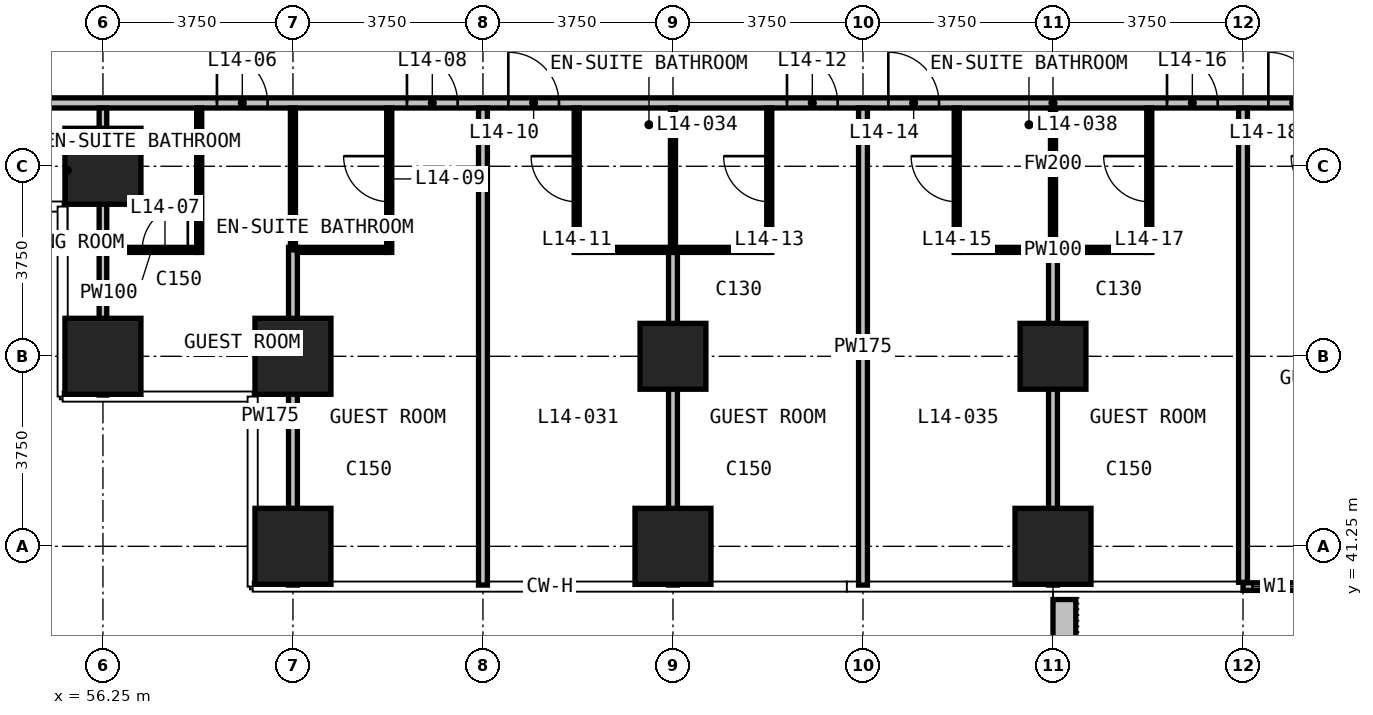
"""IFC4 building model, lengths in metres.
Left out: names, types, materials, properties, quantities, classifications, styles, units other than length and angle.
Written with IfcOpenShell. Run it as: python <this file> out.ifc"""

import sys

from ifc_helpers import new_model, si_unit, direction, frame, frame_2d, origin, origin_2d, place, context, subcontext, project, spatial, rectangle, extrude, element, fill, save


model = new_model("IFC4")
c1 = context("Model", 3, precision=1e-05, world=origin(), true_north=direction((0.0, 1.0)))
c2 = subcontext(c1, "Body", "Model", "MODEL_VIEW")
j1 = project(units=[si_unit("LENGTHUNIT", "METRE"), si_unit("PLANEANGLEUNIT", "RADIAN")], contexts=[c1])
p1 = place(None, origin())
s1 = spatial("IfcSite", under=j1, at=p1, CompositionType="ELEMENT")
p2 = place(p1, origin())
s2 = spatial("IfcBuilding", under=s1, at=p2, CompositionType="ELEMENT")
p3 = place(p2, frame((0.0, 0.0, 65.9)))
s3 = spatial("IfcBuildingStorey", under=s2, at=p3, CompositionType="ELEMENT", Elevation=65.9)
for number, where, z_axis, x_axis in (
    (1, (56.25, 45.0, 0.0), (0.0, 0.0, 1.0), (1.0, 0.0, 0.0)),
    (2, (56.25, 48.75, 0.0), (0.0, 0.0, 1.0), (1.0, 0.0, 0.0)),
    (3, (60.0, 41.25, 0.0), (0.0, 0.0, 1.0), (1.0, 0.0, 0.0)),
    (4, (60.0, 45.0, 0.0), (0.0, 0.0, 1.0), (1.0, 0.0, 0.0)),
    (5, (67.5, 41.25, 0.0), (0.0, 0.0, 1.0), (1.0, 0.0, 0.0)),
):
    element("IfcColumn", number, at=place(p3, frame(where, z_axis=z_axis, x_axis=x_axis)), inside=s3, PredefinedType="COLUMN", context=c2, shape_type="SweptSolid", body=[
        extrude(rectangle(XDim=1.5, YDim=1.5, at=origin_2d()), origin(), (0.0, 0.0, 1.0), 3.3),
    ])
p4 = place(p3, frame((67.5, 45.0, 0.0), z_axis=(0.0, 0.0, 1.0), x_axis=(1.0, 0.0, 0.0)))
e6 = element("IfcColumn", 6, at=p4, inside=s3, PredefinedType="COLUMN", context=c2, shape_type="SweptSolid", body=[
    extrude(rectangle(XDim=1.3, YDim=1.3, at=origin_2d()), origin(), (0.0, 0.0, 1.0), 3.3),
])
p5 = place(p3, frame((75.0, 41.25, 0.0), z_axis=(0.0, 0.0, 1.0), x_axis=(1.0, 0.0, 0.0)))
e7 = element("IfcColumn", 7, at=p5, inside=s3, PredefinedType="COLUMN", context=c2, shape_type="SweptSolid", body=[
    extrude(rectangle(XDim=1.5, YDim=1.5, at=origin_2d()), origin(), (0.0, 0.0, 1.0), 3.3),
])
p6 = place(p3, frame((75.0, 45.0, 0.0), z_axis=(0.0, 0.0, 1.0), x_axis=(1.0, 0.0, 0.0)))
e8 = element("IfcColumn", 8, at=p6, inside=s3, PredefinedType="COLUMN", context=c2, shape_type="SweptSolid", body=[
    extrude(rectangle(XDim=1.3, YDim=1.3, at=origin_2d()), origin(), (0.0, 0.0, 1.0), 3.3),
])
p7 = place(p3, frame((78.75, 40.455, 0.0), z_axis=(0.0, 0.0, 1.0), x_axis=(1.0, 0.0, 0.0)))
e9 = element("IfcWall", 9, at=p7, inside=s3, PredefinedType="SOLIDWALL", context=c2, shape_type="SweptSolid", body=[
    extrude(rectangle(XDim=3.75, YDim=0.15, at=frame_2d((1.875, 0.0))), origin(), (0.0, 0.0, 1.0), 3.0),
])
p8 = place(p7, frame((0.188, 0.0, 0.1)))
e10 = element("IfcOpeningElement", 10, at=p8, cuts=e9, PredefinedType="OPENING", context=c2, shape_type="SweptSolid", body=[
    extrude(rectangle(XDim=0.9, YDim=2.4, at=frame_2d((0.45, 1.2))), frame((0.0, 0.085, 0.0), z_axis=(0.0, -1.0, 0.0), x_axis=(1.0, 0.0, 0.0)), (0.0, 0.0, 1.0), 0.17),
])
p9 = place(p7, frame((1.275, 0.0, 0.0)))
e11 = element("IfcOpeningElement", 11, at=p9, cuts=e9, PredefinedType="OPENING", context=c2, shape_type="SweptSolid", body=[
    extrude(rectangle(XDim=1.2, YDim=2.4, at=frame_2d((0.6, 1.2))), frame((0.0, 0.085, 0.0), z_axis=(0.0, -1.0, 0.0), x_axis=(1.0, 0.0, 0.0)), (0.0, 0.0, 1.0), 0.17),
])
p10 = place(p3, frame((75.225, 40.2, 0.0), z_axis=(0.0, 0.0, 1.0), x_axis=(0.0, -1.0, 0.0)))
e12 = element("IfcWall", 12, at=p10, inside=s3, PredefinedType="USERDEFINED", context=c2, shape_type="SweptSolid", body=[
    extrude(rectangle(XDim=2.35, YDim=0.45, at=frame_2d((1.175, 0.0))), origin(), (0.0, 0.0, 1.0), 1.1),
])
p11 = place(p3, frame((51.735, 50.0, 0.0), z_axis=(0.0, 0.0, 1.0), x_axis=(1.0, 0.0, 0.0)))
e13 = element("IfcWall", 13, at=p11, inside=s3, PredefinedType="PARTITIONING", context=c2, shape_type="SweptSolid", body=[
    extrude(rectangle(XDim=46.53, YDim=0.2, at=frame_2d((23.265, 0.0))), origin(), (0.0, 0.0, 1.0), 3.0),
])
p12 = place(p11, frame((6.765, 0.0, 0.0)))
e14 = element("IfcOpeningElement", 14, at=p12, cuts=e13, PredefinedType="OPENING", context=c2, shape_type="SweptSolid", body=[
    extrude(rectangle(XDim=1.0, YDim=2.2, at=frame_2d((0.5, 1.1))), frame((0.0, 0.11, 0.0), z_axis=(0.0, -1.0, 0.0), x_axis=(1.0, 0.0, 0.0)), (0.0, 0.0, 1.0), 0.22),
])
p13 = place(p11, frame((10.515, 0.0, 0.0)))
e15 = element("IfcOpeningElement", 15, at=p13, cuts=e13, PredefinedType="OPENING", context=c2, shape_type="SweptSolid", body=[
    extrude(rectangle(XDim=1.0, YDim=2.2, at=frame_2d((0.5, 1.1))), frame((0.0, 0.11, 0.0), z_axis=(0.0, -1.0, 0.0), x_axis=(1.0, 0.0, 0.0)), (0.0, 0.0, 1.0), 0.22),
])
p14 = place(p11, frame((12.515, 0.0, 0.0)))
e16 = element("IfcOpeningElement", 16, at=p14, cuts=e13, PredefinedType="OPENING", context=c2, shape_type="SweptSolid", body=[
    extrude(rectangle(XDim=1.0, YDim=2.2, at=frame_2d((0.5, 1.1))), frame((0.0, 0.11, 0.0), z_axis=(0.0, -1.0, 0.0), x_axis=(1.0, 0.0, 0.0)), (0.0, 0.0, 1.0), 0.22),
])
p15 = place(p11, frame((18.015, 0.0, 0.0)))
e17 = element("IfcOpeningElement", 17, at=p15, cuts=e13, PredefinedType="OPENING", context=c2, shape_type="SweptSolid", body=[
    extrude(rectangle(XDim=1.0, YDim=2.2, at=frame_2d((0.5, 1.1))), frame((0.0, 0.11, 0.0), z_axis=(0.0, -1.0, 0.0), x_axis=(1.0, 0.0, 0.0)), (0.0, 0.0, 1.0), 0.22),
])
p16 = place(p11, frame((20.015, 0.0, 0.0)))
e18 = element("IfcOpeningElement", 18, at=p16, cuts=e13, PredefinedType="OPENING", context=c2, shape_type="SweptSolid", body=[
    extrude(rectangle(XDim=1.0, YDim=2.2, at=frame_2d((0.5, 1.1))), frame((0.0, 0.11, 0.0), z_axis=(0.0, -1.0, 0.0), x_axis=(1.0, 0.0, 0.0)), (0.0, 0.0, 1.0), 0.22),
])
p17 = place(p11, frame((25.515, 0.0, 0.0)))
e19 = element("IfcOpeningElement", 19, at=p17, cuts=e13, PredefinedType="OPENING", context=c2, shape_type="SweptSolid", body=[
    extrude(rectangle(XDim=1.0, YDim=2.2, at=frame_2d((0.5, 1.1))), frame((0.0, 0.11, 0.0), z_axis=(0.0, -1.0, 0.0), x_axis=(1.0, 0.0, 0.0)), (0.0, 0.0, 1.0), 0.22),
])
p18 = place(p11, frame((27.515, 0.0, 0.0)))
e20 = element("IfcOpeningElement", 20, at=p18, cuts=e13, PredefinedType="OPENING", context=c2, shape_type="SweptSolid", body=[
    extrude(rectangle(XDim=1.0, YDim=2.2, at=frame_2d((0.5, 1.1))), frame((0.0, 0.11, 0.0), z_axis=(0.0, -1.0, 0.0), x_axis=(1.0, 0.0, 0.0)), (0.0, 0.0, 1.0), 0.22),
])
p19 = place(p11, frame((33.015, 0.0, 0.0)))
e21 = element("IfcOpeningElement", 21, at=p19, cuts=e13, PredefinedType="OPENING", context=c2, shape_type="SweptSolid", body=[
    extrude(rectangle(XDim=1.0, YDim=2.2, at=frame_2d((0.5, 1.1))), frame((0.0, 0.11, 0.0), z_axis=(0.0, -1.0, 0.0), x_axis=(1.0, 0.0, 0.0)), (0.0, 0.0, 1.0), 0.22),
])
p20 = place(p11, frame((35.015, 0.0, 0.0)))
e22 = element("IfcOpeningElement", 22, at=p20, cuts=e13, PredefinedType="OPENING", context=c2, shape_type="SweptSolid", body=[
    extrude(rectangle(XDim=1.0, YDim=2.2, at=frame_2d((0.5, 1.1))), frame((0.0, 0.11, 0.0), z_axis=(0.0, -1.0, 0.0), x_axis=(1.0, 0.0, 0.0)), (0.0, 0.0, 1.0), 0.22),
])
p21 = place(p11, frame((38.765, 0.0, 0.0)))
e23 = element("IfcOpeningElement", 23, at=p21, cuts=e13, PredefinedType="OPENING", context=c2, shape_type="SweptSolid", body=[
    extrude(rectangle(XDim=1.0, YDim=2.2, at=frame_2d((0.5, 1.1))), frame((0.0, 0.11, 0.0), z_axis=(0.0, -1.0, 0.0), x_axis=(1.0, 0.0, 0.0)), (0.0, 0.0, 1.0), 0.22),
])
p22 = place(p11, frame((1.8, 0.0, 0.0)))
e24 = element("IfcOpeningElement", 24, at=p22, cuts=e13, PredefinedType="OPENING", context=c2, shape_type="SweptSolid", body=[
    extrude(rectangle(XDim=0.9, YDim=2.2, at=frame_2d((0.45, 1.1))), frame((0.0, 0.11, 0.0), z_axis=(0.0, -1.0, 0.0), x_axis=(1.0, 0.0, 0.0)), (0.0, 0.0, 1.0), 0.22),
])
p23 = place(p11, frame((43.815, 0.0, 0.0)))
e25 = element("IfcOpeningElement", 25, at=p23, cuts=e13, PredefinedType="OPENING", context=c2, shape_type="SweptSolid", body=[
    extrude(rectangle(XDim=0.9, YDim=2.2, at=frame_2d((0.45, 1.1))), frame((0.0, 0.11, 0.0), z_axis=(0.0, -1.0, 0.0), x_axis=(1.0, 0.0, 0.0)), (0.0, 0.0, 1.0), 0.22),
])
p24 = place(p3, frame((60.0, 40.485, 0.0), z_axis=(0.0, 0.0, 1.0), x_axis=(0.0, 1.0, 0.0)))
e26 = element("IfcWall", 26, at=p24, inside=s3, PredefinedType="PARTITIONING", context=c2, shape_type="SweptSolid", body=[
    extrude(rectangle(XDim=6.665, YDim=0.175, at=frame_2d((3.333, 0.0))), origin(), (0.0, 0.0, 1.0), 3.0),
])
p25 = place(p3, frame((63.75, 40.485, 0.0), z_axis=(0.0, 0.0, 1.0), x_axis=(0.0, 1.0, 0.0)))
e27 = element("IfcWall", 27, at=p25, inside=s3, PredefinedType="PARTITIONING", context=c2, shape_type="SweptSolid", body=[
    extrude(rectangle(XDim=9.415, YDim=0.175, at=frame_2d((4.708, 0.0))), origin(), (0.0, 0.0, 1.0), 3.0),
])
p26 = place(p3, frame((67.5, 40.485, 0.0), z_axis=(0.0, 0.0, 1.0), x_axis=(0.0, 1.0, 0.0)))
e28 = element("IfcWall", 28, at=p26, inside=s3, PredefinedType="PARTITIONING", context=c2, shape_type="SweptSolid", body=[
    extrude(rectangle(XDim=6.565, YDim=0.175, at=frame_2d((3.282, 0.0))), origin(), (0.0, 0.0, 1.0), 3.0),
])
p27 = place(p3, frame((71.25, 40.485, 0.0), z_axis=(0.0, 0.0, 1.0), x_axis=(0.0, 1.0, 0.0)))
e29 = element("IfcWall", 29, at=p27, inside=s3, PredefinedType="PARTITIONING", context=c2, shape_type="SweptSolid", body=[
    extrude(rectangle(XDim=9.415, YDim=0.175, at=frame_2d((4.708, 0.0))), origin(), (0.0, 0.0, 1.0), 3.0),
])
p28 = place(p3, frame((75.0, 40.485, 0.0), z_axis=(0.0, 0.0, 1.0), x_axis=(0.0, 1.0, 0.0)))
e30 = element("IfcWall", 30, at=p28, inside=s3, PredefinedType="PARTITIONING", context=c2, shape_type="SweptSolid", body=[
    extrude(rectangle(XDim=6.565, YDim=0.175, at=frame_2d((3.282, 0.0))), origin(), (0.0, 0.0, 1.0), 3.0),
])
p29 = place(p3, frame((78.75, 40.54, 0.0), z_axis=(0.0, 0.0, 1.0), x_axis=(0.0, 1.0, 0.0)))
e31 = element("IfcWall", 31, at=p29, inside=s3, PredefinedType="PARTITIONING", context=c2, shape_type="SweptSolid", body=[
    extrude(rectangle(XDim=9.36, YDim=0.175, at=frame_2d((4.68, 0.0))), origin(), (0.0, 0.0, 1.0), 3.0),
])
p30 = place(p3, frame((56.25, 44.235, 0.0), z_axis=(0.0, 0.0, 1.0), x_axis=(0.0, 1.0, 0.0)))
e32 = element("IfcWall", 32, at=p30, inside=s3, PredefinedType="PARTITIONING", context=c2, shape_type="SweptSolid", body=[
    extrude(rectangle(XDim=5.665, YDim=0.15, at=frame_2d((2.833, 0.0))), origin(), (0.0, 0.0, 1.0), 3.0),
])
p31 = place(p3, frame((56.325, 47.1, 0.0), z_axis=(0.0, 0.0, 1.0), x_axis=(1.0, 0.0, 0.0)))
e33 = element("IfcWall", 33, at=p31, inside=s3, PredefinedType="PARTITIONING", context=c2, shape_type="SweptSolid", body=[
    extrude(rectangle(XDim=1.775, YDim=0.1, at=frame_2d((0.888, 0.0))), origin(), (0.0, 0.0, 1.0), 3.0),
])
p32 = place(p31, frame((0.7, 0.0, 0.0)))
e34 = element("IfcOpeningElement", 34, at=p32, cuts=e33, PredefinedType="OPENING", context=c2, shape_type="SweptSolid", body=[
    extrude(rectangle(XDim=0.9, YDim=2.2, at=frame_2d((0.45, 1.1))), frame((0.0, 0.06, 0.0), z_axis=(0.0, -1.0, 0.0), x_axis=(1.0, 0.0, 0.0)), (0.0, 0.0, 1.0), 0.12),
])
p33 = place(p3, frame((60.088, 47.1, 0.0), z_axis=(0.0, 0.0, 1.0), x_axis=(1.0, 0.0, 0.0)))
e35 = element("IfcWall", 35, at=p33, inside=s3, PredefinedType="PARTITIONING", context=c2, shape_type="SweptSolid", body=[
    extrude(rectangle(XDim=1.762, YDim=0.1, at=frame_2d((0.881, 0.0))), origin(), (0.0, 0.0, 1.0), 3.0),
])
for number, where, z_axis, x_axis in (
    (36, (65.65, 47.1, 0.0), (0.0, 0.0, 1.0), (1.0, 0.0, 0.0)),
    (37, (73.15, 47.1, 0.0), (0.0, 0.0, 1.0), (1.0, 0.0, 0.0)),
):
    element("IfcWall", number, at=place(p3, frame(where, z_axis=z_axis, x_axis=x_axis)), inside=s3, PredefinedType="PARTITIONING", context=c2, shape_type="SweptSolid", body=[
        extrude(rectangle(XDim=3.7, YDim=0.1, at=frame_2d((1.85, 0.0))), origin(), (0.0, 0.0, 1.0), 3.0),
    ])
p34 = place(p3, frame((58.15, 47.05, 0.0), z_axis=(0.0, 0.0, 1.0), x_axis=(0.0, 1.0, 0.0)))
e38 = element("IfcWall", 38, at=p34, inside=s3, PredefinedType="PARTITIONING", context=c2, shape_type="SweptSolid", body=[
    extrude(rectangle(XDim=2.85, YDim=0.1, at=frame_2d((1.425, 0.0))), origin(), (0.0, 0.0, 1.0), 3.0),
])
p35 = place(p3, frame((60.0, 47.1, 0.0), z_axis=(0.0, 0.0, 1.0), x_axis=(0.0, 1.0, 0.0)))
e39 = element("IfcWall", 39, at=p35, inside=s3, PredefinedType="PARTITIONING", context=c2, shape_type="SweptSolid", body=[
    extrude(rectangle(XDim=2.8, YDim=0.1, at=frame_2d((1.4, 0.0))), origin(), (0.0, 0.0, 1.0), 3.0),
])
p36 = place(p3, frame((61.9, 47.05, 0.0), z_axis=(0.0, 0.0, 1.0), x_axis=(0.0, 1.0, 0.0)))
e40 = element("IfcWall", 40, at=p36, inside=s3, PredefinedType="PARTITIONING", context=c2, shape_type="SweptSolid", body=[
    extrude(rectangle(XDim=2.85, YDim=0.1, at=frame_2d((1.425, 0.0))), origin(), (0.0, 0.0, 1.0), 3.0),
])
p37 = place(p36, frame((1.0, 0.0, 0.0)))
e41 = element("IfcOpeningElement", 41, at=p37, cuts=e40, PredefinedType="OPENING", context=c2, shape_type="SweptSolid", body=[
    extrude(rectangle(XDim=0.9, YDim=2.2, at=frame_2d((0.45, 1.1))), frame((0.0, 0.06, 0.0), z_axis=(0.0, -1.0, 0.0), x_axis=(1.0, 0.0, 0.0)), (0.0, 0.0, 1.0), 0.12),
])
p38 = place(p3, frame((65.6, 47.05, 0.0), z_axis=(0.0, 0.0, 1.0), x_axis=(0.0, 1.0, 0.0)))
e42 = element("IfcWall", 42, at=p38, inside=s3, PredefinedType="PARTITIONING", context=c2, shape_type="SweptSolid", body=[
    extrude(rectangle(XDim=2.85, YDim=0.1, at=frame_2d((1.425, 0.0))), origin(), (0.0, 0.0, 1.0), 3.0),
])
p39 = place(p38, frame((1.0, 0.0, 0.0)))
e43 = element("IfcOpeningElement", 43, at=p39, cuts=e42, PredefinedType="OPENING", context=c2, shape_type="SweptSolid", body=[
    extrude(rectangle(XDim=0.9, YDim=2.2, at=frame_2d((0.45, 1.1))), frame((0.0, 0.06, 0.0), z_axis=(0.0, -1.0, 0.0), x_axis=(1.0, 0.0, 0.0)), (0.0, 0.0, 1.0), 0.12),
])
p40 = place(p3, frame((67.5, 47.15, 0.0), z_axis=(0.0, 0.0, 1.0), x_axis=(0.0, 1.0, 0.0)))
e44 = element("IfcWall", 44, at=p40, inside=s3, PredefinedType="PARTITIONING", context=c2, shape_type="SweptSolid", body=[
    extrude(rectangle(XDim=2.75, YDim=0.1, at=frame_2d((1.375, 0.0))), origin(), (0.0, 0.0, 1.0), 3.0),
])
p41 = place(p3, frame((69.4, 47.05, 0.0), z_axis=(0.0, 0.0, 1.0), x_axis=(0.0, 1.0, 0.0)))
e45 = element("IfcWall", 45, at=p41, inside=s3, PredefinedType="PARTITIONING", context=c2, shape_type="SweptSolid", body=[
    extrude(rectangle(XDim=2.85, YDim=0.1, at=frame_2d((1.425, 0.0))), origin(), (0.0, 0.0, 1.0), 3.0),
])
p42 = place(p41, frame((1.0, 0.0, 0.0)))
e46 = element("IfcOpeningElement", 46, at=p42, cuts=e45, PredefinedType="OPENING", context=c2, shape_type="SweptSolid", body=[
    extrude(rectangle(XDim=0.9, YDim=2.2, at=frame_2d((0.45, 1.1))), frame((0.0, 0.06, 0.0), z_axis=(0.0, -1.0, 0.0), x_axis=(1.0, 0.0, 0.0)), (0.0, 0.0, 1.0), 0.12),
])
p43 = place(p3, frame((73.1, 47.05, 0.0), z_axis=(0.0, 0.0, 1.0), x_axis=(0.0, 1.0, 0.0)))
e47 = element("IfcWall", 47, at=p43, inside=s3, PredefinedType="PARTITIONING", context=c2, shape_type="SweptSolid", body=[
    extrude(rectangle(XDim=2.85, YDim=0.1, at=frame_2d((1.425, 0.0))), origin(), (0.0, 0.0, 1.0), 3.0),
])
p44 = place(p43, frame((1.0, 0.0, 0.0)))
e48 = element("IfcOpeningElement", 48, at=p44, cuts=e47, PredefinedType="OPENING", context=c2, shape_type="SweptSolid", body=[
    extrude(rectangle(XDim=0.9, YDim=2.2, at=frame_2d((0.45, 1.1))), frame((0.0, 0.06, 0.0), z_axis=(0.0, -1.0, 0.0), x_axis=(1.0, 0.0, 0.0)), (0.0, 0.0, 1.0), 0.12),
])
p45 = place(p3, frame((75.0, 47.15, 0.0), z_axis=(0.0, 0.0, 1.0), x_axis=(0.0, 1.0, 0.0)))
e49 = element("IfcWall", 49, at=p45, inside=s3, PredefinedType="PARTITIONING", context=c2, shape_type="SweptSolid", body=[
    extrude(rectangle(XDim=2.75, YDim=0.1, at=frame_2d((1.375, 0.0))), origin(), (0.0, 0.0, 1.0), 3.0),
])
p46 = place(p3, frame((76.9, 47.05, 0.0), z_axis=(0.0, 0.0, 1.0), x_axis=(0.0, 1.0, 0.0)))
e50 = element("IfcWall", 50, at=p46, inside=s3, PredefinedType="PARTITIONING", context=c2, shape_type="SweptSolid", body=[
    extrude(rectangle(XDim=2.85, YDim=0.1, at=frame_2d((1.425, 0.0))), origin(), (0.0, 0.0, 1.0), 3.0),
])
p47 = place(p46, frame((1.0, 0.0, 0.0)))
e51 = element("IfcOpeningElement", 51, at=p47, cuts=e50, PredefinedType="OPENING", context=c2, shape_type="SweptSolid", body=[
    extrude(rectangle(XDim=0.9, YDim=2.2, at=frame_2d((0.45, 1.1))), frame((0.0, 0.06, 0.0), z_axis=(0.0, -1.0, 0.0), x_axis=(1.0, 0.0, 0.0)), (0.0, 0.0, 1.0), 0.12),
])
p48 = place(p8, origin())
e52 = element("IfcWindow", 52, at=p48, inside=s3, PartitioningType="SINGLE_PANEL", PredefinedType="WINDOW", context=c2, shape_type="SweptSolid", body=[
    extrude(rectangle(XDim=0.9, YDim=2.4, at=frame_2d((0.45, 1.2))), frame((0.0, 0.03, 0.0), z_axis=(0.0, -1.0, 0.0), x_axis=(1.0, 0.0, 0.0)), (0.0, 0.0, 1.0), 0.06),
])
fill(e10, e52)
p49 = place(p12, origin())
e53 = element("IfcDoor", 53, at=p49, inside=s3, OperationType="SINGLE_SWING_RIGHT", PredefinedType="DOOR", context=c2, shape_type="SweptSolid", body=[
    extrude(rectangle(XDim=1.0, YDim=2.2, at=frame_2d((0.5, 1.1))), frame((0.0, 0.025, 0.0), z_axis=(0.0, -1.0, 0.0), x_axis=(1.0, 0.0, 0.0)), (0.0, 0.0, 1.0), 0.05),
])
fill(e14, e53)
p50 = place(p32, origin())
e54 = element("IfcDoor", 54, at=p50, inside=s3, OperationType="SINGLE_SWING_RIGHT", PredefinedType="DOOR", context=c2, shape_type="SweptSolid", body=[
    extrude(rectangle(XDim=0.9, YDim=2.2, at=frame_2d((0.45, 1.1))), frame((0.0, 0.025, 0.0), z_axis=(0.0, -1.0, 0.0), x_axis=(1.0, 0.0, 0.0)), (0.0, 0.0, 1.0), 0.05),
])
fill(e34, e54)
p51 = place(p13, origin())
e55 = element("IfcDoor", 55, at=p51, inside=s3, OperationType="SINGLE_SWING_LEFT", PredefinedType="DOOR", context=c2, shape_type="SweptSolid", body=[
    extrude(rectangle(XDim=1.0, YDim=2.2, at=frame_2d((0.5, 1.1))), frame((0.0, 0.025, 0.0), z_axis=(0.0, -1.0, 0.0), x_axis=(1.0, 0.0, 0.0)), (0.0, 0.0, 1.0), 0.05),
])
fill(e15, e55)
p52 = place(p37, origin())
e56 = element("IfcDoor", 56, at=p52, inside=s3, OperationType="SINGLE_SWING_RIGHT", PredefinedType="DOOR", context=c2, shape_type="SweptSolid", body=[
    extrude(rectangle(XDim=0.9, YDim=2.2, at=frame_2d((0.45, 1.1))), frame((0.0, 0.025, 0.0), z_axis=(0.0, -1.0, 0.0), x_axis=(1.0, 0.0, 0.0)), (0.0, 0.0, 1.0), 0.05),
])
fill(e41, e56)
p53 = place(p14, origin())
e57 = element("IfcDoor", 57, at=p53, inside=s3, OperationType="SINGLE_SWING_LEFT", PredefinedType="DOOR", context=c2, shape_type="SweptSolid", body=[
    extrude(rectangle(XDim=1.0, YDim=2.2, at=frame_2d((0.5, 1.1))), frame((0.0, 0.025, 0.0), z_axis=(0.0, -1.0, 0.0), x_axis=(1.0, 0.0, 0.0)), (0.0, 0.0, 1.0), 0.05),
])
fill(e16, e57)
p54 = place(p39, origin())
e58 = element("IfcDoor", 58, at=p54, inside=s3, OperationType="SINGLE_SWING_RIGHT", PredefinedType="DOOR", context=c2, shape_type="SweptSolid", body=[
    extrude(rectangle(XDim=0.9, YDim=2.2, at=frame_2d((0.45, 1.1))), frame((0.0, 0.025, 0.0), z_axis=(0.0, -1.0, 0.0), x_axis=(1.0, 0.0, 0.0)), (0.0, 0.0, 1.0), 0.05),
])
fill(e43, e58)
p55 = place(p15, origin())
e59 = element("IfcDoor", 59, at=p55, inside=s3, OperationType="SINGLE_SWING_LEFT", PredefinedType="DOOR", context=c2, shape_type="SweptSolid", body=[
    extrude(rectangle(XDim=1.0, YDim=2.2, at=frame_2d((0.5, 1.1))), frame((0.0, 0.025, 0.0), z_axis=(0.0, -1.0, 0.0), x_axis=(1.0, 0.0, 0.0)), (0.0, 0.0, 1.0), 0.05),
])
fill(e17, e59)
p56 = place(p42, origin())
e60 = element("IfcDoor", 60, at=p56, inside=s3, OperationType="SINGLE_SWING_RIGHT", PredefinedType="DOOR", context=c2, shape_type="SweptSolid", body=[
    extrude(rectangle(XDim=0.9, YDim=2.2, at=frame_2d((0.45, 1.1))), frame((0.0, 0.025, 0.0), z_axis=(0.0, -1.0, 0.0), x_axis=(1.0, 0.0, 0.0)), (0.0, 0.0, 1.0), 0.05),
])
fill(e46, e60)
p57 = place(p16, origin())
e61 = element("IfcDoor", 61, at=p57, inside=s3, OperationType="SINGLE_SWING_LEFT", PredefinedType="DOOR", context=c2, shape_type="SweptSolid", body=[
    extrude(rectangle(XDim=1.0, YDim=2.2, at=frame_2d((0.5, 1.1))), frame((0.0, 0.025, 0.0), z_axis=(0.0, -1.0, 0.0), x_axis=(1.0, 0.0, 0.0)), (0.0, 0.0, 1.0), 0.05),
])
fill(e18, e61)
p58 = place(p44, origin())
e62 = element("IfcDoor", 62, at=p58, inside=s3, OperationType="SINGLE_SWING_RIGHT", PredefinedType="DOOR", context=c2, shape_type="SweptSolid", body=[
    extrude(rectangle(XDim=0.9, YDim=2.2, at=frame_2d((0.45, 1.1))), frame((0.0, 0.025, 0.0), z_axis=(0.0, -1.0, 0.0), x_axis=(1.0, 0.0, 0.0)), (0.0, 0.0, 1.0), 0.05),
])
fill(e48, e62)
p59 = place(p17, origin())
e63 = element("IfcDoor", 63, at=p59, inside=s3, OperationType="SINGLE_SWING_LEFT", PredefinedType="DOOR", context=c2, shape_type="SweptSolid", body=[
    extrude(rectangle(XDim=1.0, YDim=2.2, at=frame_2d((0.5, 1.1))), frame((0.0, 0.025, 0.0), z_axis=(0.0, -1.0, 0.0), x_axis=(1.0, 0.0, 0.0)), (0.0, 0.0, 1.0), 0.05),
])
fill(e19, e63)
p60 = place(p47, origin())
e64 = element("IfcDoor", 64, at=p60, inside=s3, OperationType="SINGLE_SWING_RIGHT", PredefinedType="DOOR", context=c2, shape_type="SweptSolid", body=[
    extrude(rectangle(XDim=0.9, YDim=2.2, at=frame_2d((0.45, 1.1))), frame((0.0, 0.025, 0.0), z_axis=(0.0, -1.0, 0.0), x_axis=(1.0, 0.0, 0.0)), (0.0, 0.0, 1.0), 0.05),
])
fill(e51, e64)
p61 = place(p18, origin())
e65 = element("IfcDoor", 65, at=p61, inside=s3, OperationType="SINGLE_SWING_RIGHT", PredefinedType="DOOR", context=c2, shape_type="SweptSolid", body=[
    extrude(rectangle(XDim=1.0, YDim=2.2, at=frame_2d((0.5, 1.1))), frame((0.0, 0.025, 0.0), z_axis=(0.0, -1.0, 0.0), x_axis=(1.0, 0.0, 0.0)), (0.0, 0.0, 1.0), 0.05),
])
fill(e20, e65)
save(model, sys.argv[1])
